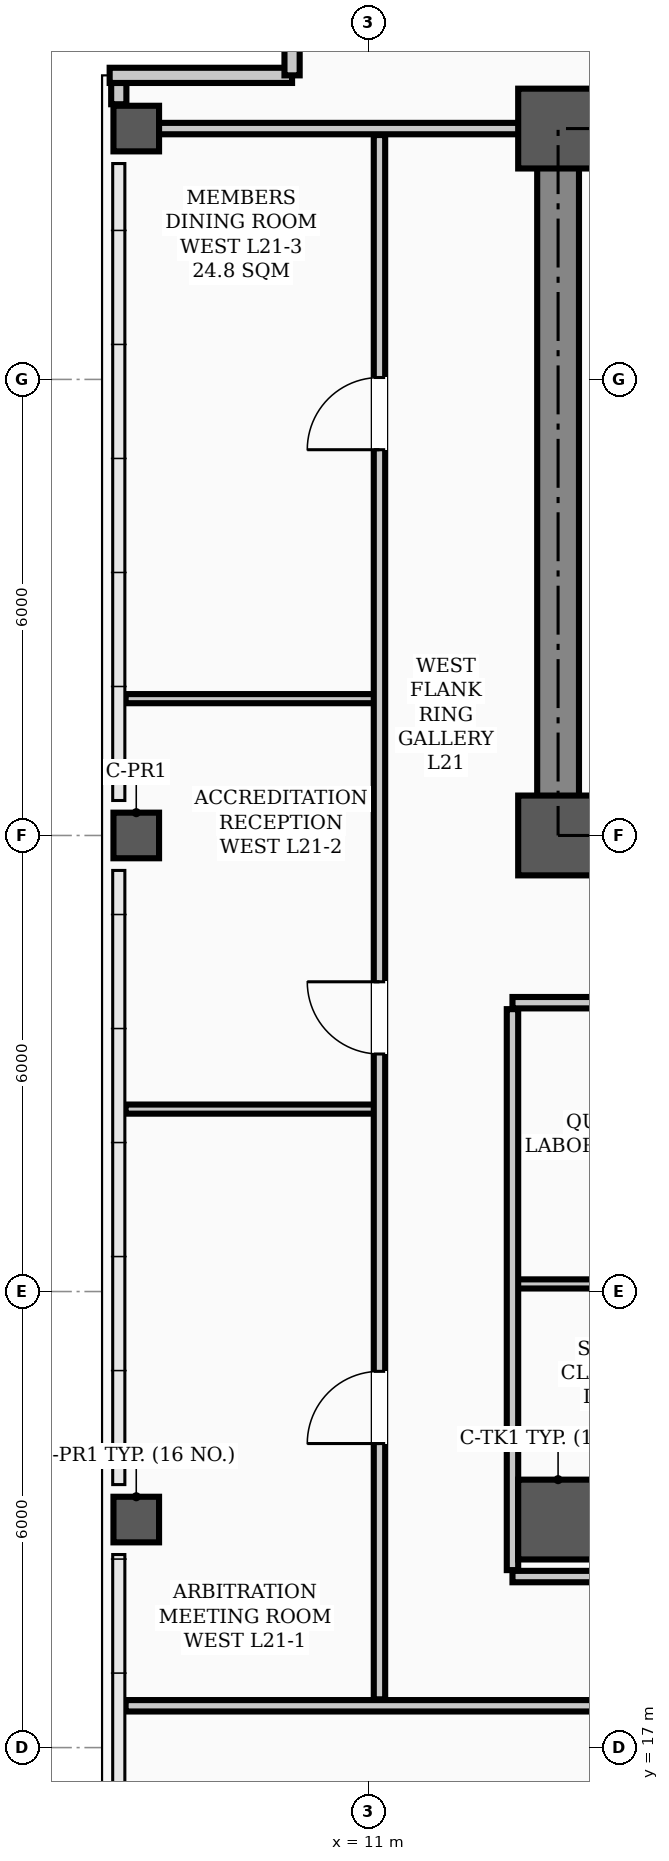
"""IFC4 building model, lengths in metres.
Left out: names, types, materials, properties, quantities, classifications, styles, units other than length and angle.
Written with IfcOpenShell. Run it as: python <this file> out.ifc"""

import sys

from ifc_helpers import new_model, si_unit, direction, frame, frame_2d, origin, origin_2d, place, context, subcontext, project, spatial, rectangle, hollow_rectangle, extrude, element, fill, save


model = new_model("IFC4")
c1 = context("Model", 3, precision=1e-05, world=origin(), true_north=direction((0.0, 1.0)))
c2 = subcontext(c1, "Body", "Model", "MODEL_VIEW")
j1 = project(units=[si_unit("LENGTHUNIT", "METRE"), si_unit("PLANEANGLEUNIT", "RADIAN")], contexts=[c1])
p1 = place(None, origin())
s1 = spatial("IfcSite", under=j1, at=p1, CompositionType="ELEMENT")
p2 = place(p1, origin())
s2 = spatial("IfcBuilding", under=s1, at=p2, CompositionType="ELEMENT")
p3 = place(p2, frame((0.0, 0.0, 85.0)))
s3 = spatial("IfcBuildingStorey", under=s2, at=p3, CompositionType="ELEMENT", Elevation=85.0)
for number, where, z_axis, x_axis in (
    (1, (13.5, 29.0, 0.0), (0.0, 0.0, 1.0), (1.0, 0.0, 0.0)),
    (2, (13.5, 38.3, 0.0), (0.0, 0.0, 1.0), (1.0, 0.0, 0.0)),
    (3, (13.5, 20.0, 0.0), (0.0, 0.0, 1.0), (1.0, 0.0, 0.0)),
):
    element("IfcColumn", number, at=place(p3, frame(where, z_axis=z_axis, x_axis=x_axis)), inside=s3, PredefinedType="COLUMN", context=c2, shape_type="SweptSolid", body=[
        extrude(hollow_rectangle(XDim=1.05, YDim=1.05, WallThickness=0.038, InnerFilletRadius=0.019, OuterFilletRadius=0.057, at=origin_2d()), origin(), (0.0, 0.0, 1.0), 3.9),
    ])
for number, where, z_axis, x_axis in (
    (4, (7.95, 20.0, 0.0), (0.0, 0.0, 1.0), (1.0, 0.0, 0.0)),
    (5, (7.95, 29.0, 0.0), (0.0, 0.0, 1.0), (1.0, 0.0, 0.0)),
    (6, (7.95, 38.3, 0.0), (0.0, 0.0, 1.0), (1.0, 0.0, 0.0)),
):
    element("IfcColumn", number, at=place(p3, frame(where, z_axis=z_axis, x_axis=x_axis)), inside=s3, PredefinedType="COLUMN", context=c2, shape_type="SweptSolid", body=[
        extrude(hollow_rectangle(XDim=0.6, YDim=0.6, WallThickness=0.026, InnerFilletRadius=0.013, OuterFilletRadius=0.039, at=origin_2d()), origin(), (0.0, 0.0, 1.0), 3.9),
    ])
p4 = place(p3, frame((7.72, 38.62, 0.0), z_axis=(0.0, 0.0, 1.0), x_axis=(0.0, 1.0, 0.0)))
e7 = element("IfcWall", 7, at=p4, inside=s3, PredefinedType="PARAPET", context=c2, shape_type="SweptSolid", body=[
    extrude(rectangle(XDim=0.28, YDim=0.2, at=frame_2d((0.14, 0.0))), origin(), (0.0, 0.0, 1.0), 1.2),
])
for number, where, z_axis, x_axis in (
    (8, (7.6, 39.0, 0.0), (0.0, 0.0, 1.0), (1.0, 0.0, 0.0)),
    (9, (10.0, 39.0, 0.0), (0.0, 0.0, 1.0), (0.0, 1.0, 0.0)),
):
    element("IfcWall", number, at=place(p3, frame(where, z_axis=z_axis, x_axis=x_axis)), inside=s3, PredefinedType="PARAPET", context=c2, shape_type="SweptSolid", body=[
        extrude(rectangle(XDim=2.4, YDim=0.2, at=frame_2d((1.2, 0.0))), origin(), (0.0, 0.0, 1.0), 1.2),
    ])
p5 = place(p3, frame((13.5, 29.0, 0.0), z_axis=(0.0, 0.0, 1.0), x_axis=(1.0, 0.0, 0.0)))
e10 = element("IfcWall", 10, at=p5, inside=s3, PredefinedType="SHEAR", context=c2, shape_type="SweptSolid", body=[
    extrude(rectangle(XDim=30.5, YDim=0.55, at=frame_2d((15.25, 0.0))), origin(), (0.0, 0.0, 1.0), 3.72),
])
p6 = place(p5, frame((1.75, 0.0, 0.0)))
e11 = element("IfcOpeningElement", 11, at=p6, cuts=e10, PredefinedType="OPENING", context=c2, shape_type="SweptSolid", body=[
    extrude(rectangle(XDim=1.1, YDim=2.08, at=frame_2d((0.55, 1.04))), frame((0.0, 0.285, 0.0), z_axis=(0.0, -1.0, 0.0), x_axis=(1.0, 0.0, 0.0)), (0.0, 0.0, 1.0), 0.57),
])
p7 = place(p5, frame((26.7, 0.0, 0.0)))
e12 = element("IfcOpeningElement", 12, at=p7, cuts=e10, PredefinedType="OPENING", context=c2, shape_type="SweptSolid", body=[
    extrude(rectangle(XDim=1.1, YDim=2.08, at=frame_2d((0.55, 1.04))), frame((0.0, 0.285, 0.0), z_axis=(0.0, -1.0, 0.0), x_axis=(1.0, 0.0, 0.0)), (0.0, 0.0, 1.0), 0.57),
])
p8 = place(p5, frame((6.8, 0.0, 0.0)))
e13 = element("IfcOpeningElement", 13, at=p8, cuts=e10, PredefinedType="OPENING", context=c2, shape_type="SweptSolid", body=[
    extrude(rectangle(XDim=1.1, YDim=2.08, at=frame_2d((0.55, 1.04))), frame((0.0, 0.285, 0.0), z_axis=(0.0, -1.0, 0.0), x_axis=(1.0, 0.0, 0.0)), (0.0, 0.0, 1.0), 0.57),
])
p9 = place(p5, frame((13.2, 0.0, 0.0)))
e14 = element("IfcOpeningElement", 14, at=p9, cuts=e10, PredefinedType="OPENING", context=c2, shape_type="SweptSolid", body=[
    extrude(rectangle(XDim=1.6, YDim=2.08, at=frame_2d((0.8, 1.04))), frame((0.0, 0.285, 0.0), z_axis=(0.0, -1.0, 0.0), x_axis=(1.0, 0.0, 0.0)), (0.0, 0.0, 1.0), 0.57),
])
p10 = place(p5, frame((19.5, 0.0, 0.0)))
e15 = element("IfcOpeningElement", 15, at=p10, cuts=e10, PredefinedType="OPENING", context=c2, shape_type="SweptSolid", body=[
    extrude(rectangle(XDim=0.9, YDim=2.08, at=frame_2d((0.45, 1.04))), frame((0.0, 0.285, 0.0), z_axis=(0.0, -1.0, 0.0), x_axis=(1.0, 0.0, 0.0)), (0.0, 0.0, 1.0), 0.57),
])
p11 = place(p5, frame((21.55, 0.0, 0.0)))
e16 = element("IfcOpeningElement", 16, at=p11, cuts=e10, PredefinedType="OPENING", context=c2, shape_type="SweptSolid", body=[
    extrude(rectangle(XDim=0.9, YDim=2.08, at=frame_2d((0.45, 1.04))), frame((0.0, 0.285, 0.0), z_axis=(0.0, -1.0, 0.0), x_axis=(1.0, 0.0, 0.0)), (0.0, 0.0, 1.0), 0.57),
])
p12 = place(p3, frame((13.5, 38.3, 0.0), z_axis=(0.0, 0.0, 1.0), x_axis=(1.0, 0.0, 0.0)))
e17 = element("IfcWall", 17, at=p12, inside=s3, PredefinedType="SHEAR", context=c2, shape_type="SweptSolid", body=[
    extrude(rectangle(XDim=30.5, YDim=0.55, at=frame_2d((15.25, 0.0))), origin(), (0.0, 0.0, 1.0), 3.72),
])
p13 = place(p3, frame((13.5, 29.35, 0.0), z_axis=(0.0, 0.0, 1.0), x_axis=(0.0, 1.0, 0.0)))
e18 = element("IfcWall", 18, at=p13, inside=s3, PredefinedType="SHEAR", context=c2, shape_type="SweptSolid", body=[
    extrude(rectangle(XDim=8.6, YDim=0.55, at=frame_2d((4.3, 0.0))), origin(), (0.0, 0.0, 1.0), 3.72),
])
p14 = place(p3, frame((12.9, 26.8, 0.0), z_axis=(0.0, 0.0, 1.0), x_axis=(1.0, 0.0, 0.0)))
e19 = element("IfcWall", 19, at=p14, inside=s3, PredefinedType="PARTITIONING", context=c2, shape_type="SweptSolid", body=[
    extrude(rectangle(XDim=31.7, YDim=0.15, at=frame_2d((15.85, 0.0))), origin(), (0.0, 0.0, 1.0), 3.1),
])
p15 = place(p14, frame((13.6, 0.0, 0.0)))
e20 = element("IfcOpeningElement", 20, at=p15, cuts=e19, PredefinedType="OPENING", context=c2, shape_type="SweptSolid", body=[
    extrude(rectangle(XDim=1.6, YDim=2.08, at=frame_2d((0.8, 1.04))), frame((0.0, 0.085, 0.0), z_axis=(0.0, -1.0, 0.0), x_axis=(1.0, 0.0, 0.0)), (0.0, 0.0, 1.0), 0.17),
])
p16 = place(p14, frame((3.275, 0.0, 0.0)))
e21 = element("IfcOpeningElement", 21, at=p16, cuts=e19, PredefinedType="OPENING", context=c2, shape_type="SweptSolid", body=[
    extrude(rectangle(XDim=0.95, YDim=2.08, at=frame_2d((0.475, 1.04))), frame((0.0, 0.085, 0.0), z_axis=(0.0, -1.0, 0.0), x_axis=(1.0, 0.0, 0.0)), (0.0, 0.0, 1.0), 0.17),
])
p17 = place(p14, frame((9.025, 0.0, 0.0)))
e22 = element("IfcOpeningElement", 22, at=p17, cuts=e19, PredefinedType="OPENING", context=c2, shape_type="SweptSolid", body=[
    extrude(rectangle(XDim=0.95, YDim=2.08, at=frame_2d((0.475, 1.04))), frame((0.0, 0.085, 0.0), z_axis=(0.0, -1.0, 0.0), x_axis=(1.0, 0.0, 0.0)), (0.0, 0.0, 1.0), 0.17),
])
p18 = place(p14, frame((19.525, 0.0, 0.0)))
e23 = element("IfcOpeningElement", 23, at=p18, cuts=e19, PredefinedType="OPENING", context=c2, shape_type="SweptSolid", body=[
    extrude(rectangle(XDim=0.95, YDim=2.08, at=frame_2d((0.475, 1.04))), frame((0.0, 0.085, 0.0), z_axis=(0.0, -1.0, 0.0), x_axis=(1.0, 0.0, 0.0)), (0.0, 0.0, 1.0), 0.17),
])
p19 = place(p14, frame((26.725, 0.0, 0.0)))
e24 = element("IfcOpeningElement", 24, at=p19, cuts=e19, PredefinedType="OPENING", context=c2, shape_type="SweptSolid", body=[
    extrude(rectangle(XDim=0.95, YDim=2.08, at=frame_2d((0.475, 1.04))), frame((0.0, 0.085, 0.0), z_axis=(0.0, -1.0, 0.0), x_axis=(1.0, 0.0, 0.0)), (0.0, 0.0, 1.0), 0.17),
])
p20 = place(p3, frame((7.81, 17.55, 0.0), z_axis=(0.0, 0.0, 1.0), x_axis=(1.0, 0.0, 0.0)))
e25 = element("IfcWall", 25, at=p20, inside=s3, PredefinedType="PARTITIONING", context=c2, shape_type="SweptSolid", body=[
    extrude(rectangle(XDim=49.38, YDim=0.15, at=frame_2d((24.69, 0.0))), origin(), (0.0, 0.0, 1.0), 3.1),
])
p21 = place(p20, frame((7.465, 0.0, 0.0)))
e26 = element("IfcOpeningElement", 26, at=p21, cuts=e25, PredefinedType="OPENING", context=c2, shape_type="SweptSolid", body=[
    extrude(rectangle(XDim=0.95, YDim=2.08, at=frame_2d((0.475, 1.04))), frame((0.0, 0.085, 0.0), z_axis=(0.0, -1.0, 0.0), x_axis=(1.0, 0.0, 0.0)), (0.0, 0.0, 1.0), 0.17),
])
p22 = place(p20, frame((11.915, 0.0, 0.0)))
e27 = element("IfcOpeningElement", 27, at=p22, cuts=e25, PredefinedType="OPENING", context=c2, shape_type="SweptSolid", body=[
    extrude(rectangle(XDim=0.95, YDim=2.08, at=frame_2d((0.475, 1.04))), frame((0.0, 0.085, 0.0), z_axis=(0.0, -1.0, 0.0), x_axis=(1.0, 0.0, 0.0)), (0.0, 0.0, 1.0), 0.17),
])
p23 = place(p20, frame((18.915, 0.0, 0.0)))
e28 = element("IfcOpeningElement", 28, at=p23, cuts=e25, PredefinedType="OPENING", context=c2, shape_type="SweptSolid", body=[
    extrude(rectangle(XDim=0.95, YDim=2.08, at=frame_2d((0.475, 1.04))), frame((0.0, 0.085, 0.0), z_axis=(0.0, -1.0, 0.0), x_axis=(1.0, 0.0, 0.0)), (0.0, 0.0, 1.0), 0.17),
])
p24 = place(p20, frame((26.015, 0.0, 0.0)))
e29 = element("IfcOpeningElement", 29, at=p24, cuts=e25, PredefinedType="OPENING", context=c2, shape_type="SweptSolid", body=[
    extrude(rectangle(XDim=0.95, YDim=2.08, at=frame_2d((0.475, 1.04))), frame((0.0, 0.085, 0.0), z_axis=(0.0, -1.0, 0.0), x_axis=(1.0, 0.0, 0.0)), (0.0, 0.0, 1.0), 0.17),
])
p25 = place(p20, frame((32.815, 0.0, 0.0)))
e30 = element("IfcOpeningElement", 30, at=p25, cuts=e25, PredefinedType="OPENING", context=c2, shape_type="SweptSolid", body=[
    extrude(rectangle(XDim=0.95, YDim=2.08, at=frame_2d((0.475, 1.04))), frame((0.0, 0.085, 0.0), z_axis=(0.0, -1.0, 0.0), x_axis=(1.0, 0.0, 0.0)), (0.0, 0.0, 1.0), 0.17),
])
p26 = place(p20, frame((37.09, 0.0, 0.0)))
e31 = element("IfcOpeningElement", 31, at=p26, cuts=e25, PredefinedType="OPENING", context=c2, shape_type="SweptSolid", body=[
    extrude(rectangle(XDim=0.95, YDim=2.08, at=frame_2d((0.475, 1.04))), frame((0.0, 0.085, 0.0), z_axis=(0.0, -1.0, 0.0), x_axis=(1.0, 0.0, 0.0)), (0.0, 0.0, 1.0), 0.17),
])
p27 = place(p3, frame((12.9, 19.25, 0.0), z_axis=(0.0, 0.0, 1.0), x_axis=(1.0, 0.0, 0.0)))
e32 = element("IfcWall", 32, at=p27, inside=s3, PredefinedType="PARTITIONING", context=c2, shape_type="SweptSolid", body=[
    extrude(rectangle(XDim=13.3, YDim=0.15, at=frame_2d((6.65, 0.0))), origin(), (0.0, 0.0, 1.0), 3.1),
])
p28 = place(p27, frame((3.275, 0.0, 0.0)))
e33 = element("IfcOpeningElement", 33, at=p28, cuts=e32, PredefinedType="OPENING", context=c2, shape_type="SweptSolid", body=[
    extrude(rectangle(XDim=0.95, YDim=2.08, at=frame_2d((0.475, 1.04))), frame((0.0, 0.085, 0.0), z_axis=(0.0, -1.0, 0.0), x_axis=(1.0, 0.0, 0.0)), (0.0, 0.0, 1.0), 0.17),
])
p29 = place(p27, frame((9.025, 0.0, 0.0)))
e34 = element("IfcOpeningElement", 34, at=p29, cuts=e32, PredefinedType="OPENING", context=c2, shape_type="SweptSolid", body=[
    extrude(rectangle(XDim=0.95, YDim=2.08, at=frame_2d((0.475, 1.04))), frame((0.0, 0.085, 0.0), z_axis=(0.0, -1.0, 0.0), x_axis=(1.0, 0.0, 0.0)), (0.0, 0.0, 1.0), 0.17),
])
p30 = place(p3, frame((7.81, 38.3, 0.0), z_axis=(0.0, 0.0, 1.0), x_axis=(1.0, 0.0, 0.0)))
e35 = element("IfcWall", 35, at=p30, inside=s3, PredefinedType="PARTITIONING", context=c2, shape_type="SweptSolid", body=[
    extrude(rectangle(XDim=5.69, YDim=0.15, at=frame_2d((2.845, 0.0))), origin(), (0.0, 0.0, 1.0), 3.0),
])
p31 = place(p3, frame((12.9, 23.1, 0.0), z_axis=(0.0, 0.0, 1.0), x_axis=(1.0, 0.0, 0.0)))
e36 = element("IfcWall", 36, at=p31, inside=s3, PredefinedType="PARTITIONING", context=c2, shape_type="SweptSolid", body=[
    extrude(rectangle(XDim=7.5, YDim=0.12, at=frame_2d((3.75, 0.0))), origin(), (0.0, 0.0, 1.0), 3.1),
])
for number, where, z_axis, x_axis in (
    (37, (7.81, 25.4, 0.0), (0.0, 0.0, 1.0), (1.0, 0.0, 0.0)),
    (38, (7.81, 30.8, 0.0), (0.0, 0.0, 1.0), (1.0, 0.0, 0.0)),
):
    element("IfcWall", number, at=place(p3, frame(where, z_axis=z_axis, x_axis=x_axis)), inside=s3, PredefinedType="PARTITIONING", context=c2, shape_type="SweptSolid", body=[
        extrude(rectangle(XDim=3.34, YDim=0.12, at=frame_2d((1.67, 0.0))), origin(), (0.0, 0.0, 1.0), 3.212),
    ])
p32 = place(p3, frame((11.15, 17.635, 0.0), z_axis=(0.0, 0.0, 1.0), x_axis=(0.0, 1.0, 0.0)))
e39 = element("IfcWall", 39, at=p32, inside=s3, PredefinedType="PARTITIONING", context=c2, shape_type="SweptSolid", body=[
    extrude(rectangle(XDim=20.58, YDim=0.15, at=frame_2d((10.29, 0.0))), origin(), (0.0, 0.0, 1.0), 3.0),
])
p33 = place(p32, frame((3.365, 0.0, 0.0)))
e40 = element("IfcOpeningElement", 40, at=p33, cuts=e39, PredefinedType="OPENING", context=c2, shape_type="SweptSolid", body=[
    extrude(rectangle(XDim=0.95, YDim=2.08, at=frame_2d((0.475, 1.04))), frame((0.0, 0.085, 0.0), z_axis=(0.0, -1.0, 0.0), x_axis=(1.0, 0.0, 0.0)), (0.0, 0.0, 1.0), 0.17),
])
p34 = place(p32, frame((8.49, 0.0, 0.0)))
e41 = element("IfcOpeningElement", 41, at=p34, cuts=e39, PredefinedType="OPENING", context=c2, shape_type="SweptSolid", body=[
    extrude(rectangle(XDim=0.95, YDim=2.08, at=frame_2d((0.475, 1.04))), frame((0.0, 0.085, 0.0), z_axis=(0.0, -1.0, 0.0), x_axis=(1.0, 0.0, 0.0)), (0.0, 0.0, 1.0), 0.17),
])
p35 = place(p32, frame((16.44, 0.0, 0.0)))
e42 = element("IfcOpeningElement", 42, at=p35, cuts=e39, PredefinedType="OPENING", context=c2, shape_type="SweptSolid", body=[
    extrude(rectangle(XDim=0.95, YDim=2.08, at=frame_2d((0.475, 1.04))), frame((0.0, 0.085, 0.0), z_axis=(0.0, -1.0, 0.0), x_axis=(1.0, 0.0, 0.0)), (0.0, 0.0, 1.0), 0.17),
])
p36 = place(p3, frame((12.9, 19.335, 0.0), z_axis=(0.0, 0.0, 1.0), x_axis=(0.0, 1.0, 0.0)))
e43 = element("IfcWall", 43, at=p36, inside=s3, PredefinedType="PARTITIONING", context=c2, shape_type="SweptSolid", body=[
    extrude(rectangle(XDim=7.38, YDim=0.15, at=frame_2d((3.69, 0.0))), origin(), (0.0, 0.0, 1.0), 3.0),
])
p37 = place(p33, origin())
e44 = element("IfcDoor", 44, at=p37, inside=s3, OperationType="SINGLE_SWING_LEFT", PredefinedType="DOOR", context=c2, shape_type="SweptSolid", body=[
    extrude(rectangle(XDim=0.95, YDim=2.08, at=frame_2d((0.475, 1.04))), frame((0.0, 0.025, 0.0), z_axis=(0.0, -1.0, 0.0), x_axis=(1.0, 0.0, 0.0)), (0.0, 0.0, 1.0), 0.05),
])
fill(e40, e44)
p38 = place(p34, origin())
e45 = element("IfcDoor", 45, at=p38, inside=s3, OperationType="SINGLE_SWING_RIGHT", PredefinedType="DOOR", context=c2, shape_type="SweptSolid", body=[
    extrude(rectangle(XDim=0.95, YDim=2.08, at=frame_2d((0.475, 1.04))), frame((0.0, 0.025, 0.0), z_axis=(0.0, -1.0, 0.0), x_axis=(1.0, 0.0, 0.0)), (0.0, 0.0, 1.0), 0.05),
])
fill(e41, e45)
p39 = place(p35, origin())
e46 = element("IfcDoor", 46, at=p39, inside=s3, OperationType="SINGLE_SWING_LEFT", PredefinedType="DOOR", context=c2, shape_type="SweptSolid", body=[
    extrude(rectangle(XDim=0.95, YDim=2.08, at=frame_2d((0.475, 1.04))), frame((0.0, 0.025, 0.0), z_axis=(0.0, -1.0, 0.0), x_axis=(1.0, 0.0, 0.0)), (0.0, 0.0, 1.0), 0.05),
])
fill(e42, e46)
save(model, sys.argv[1])
